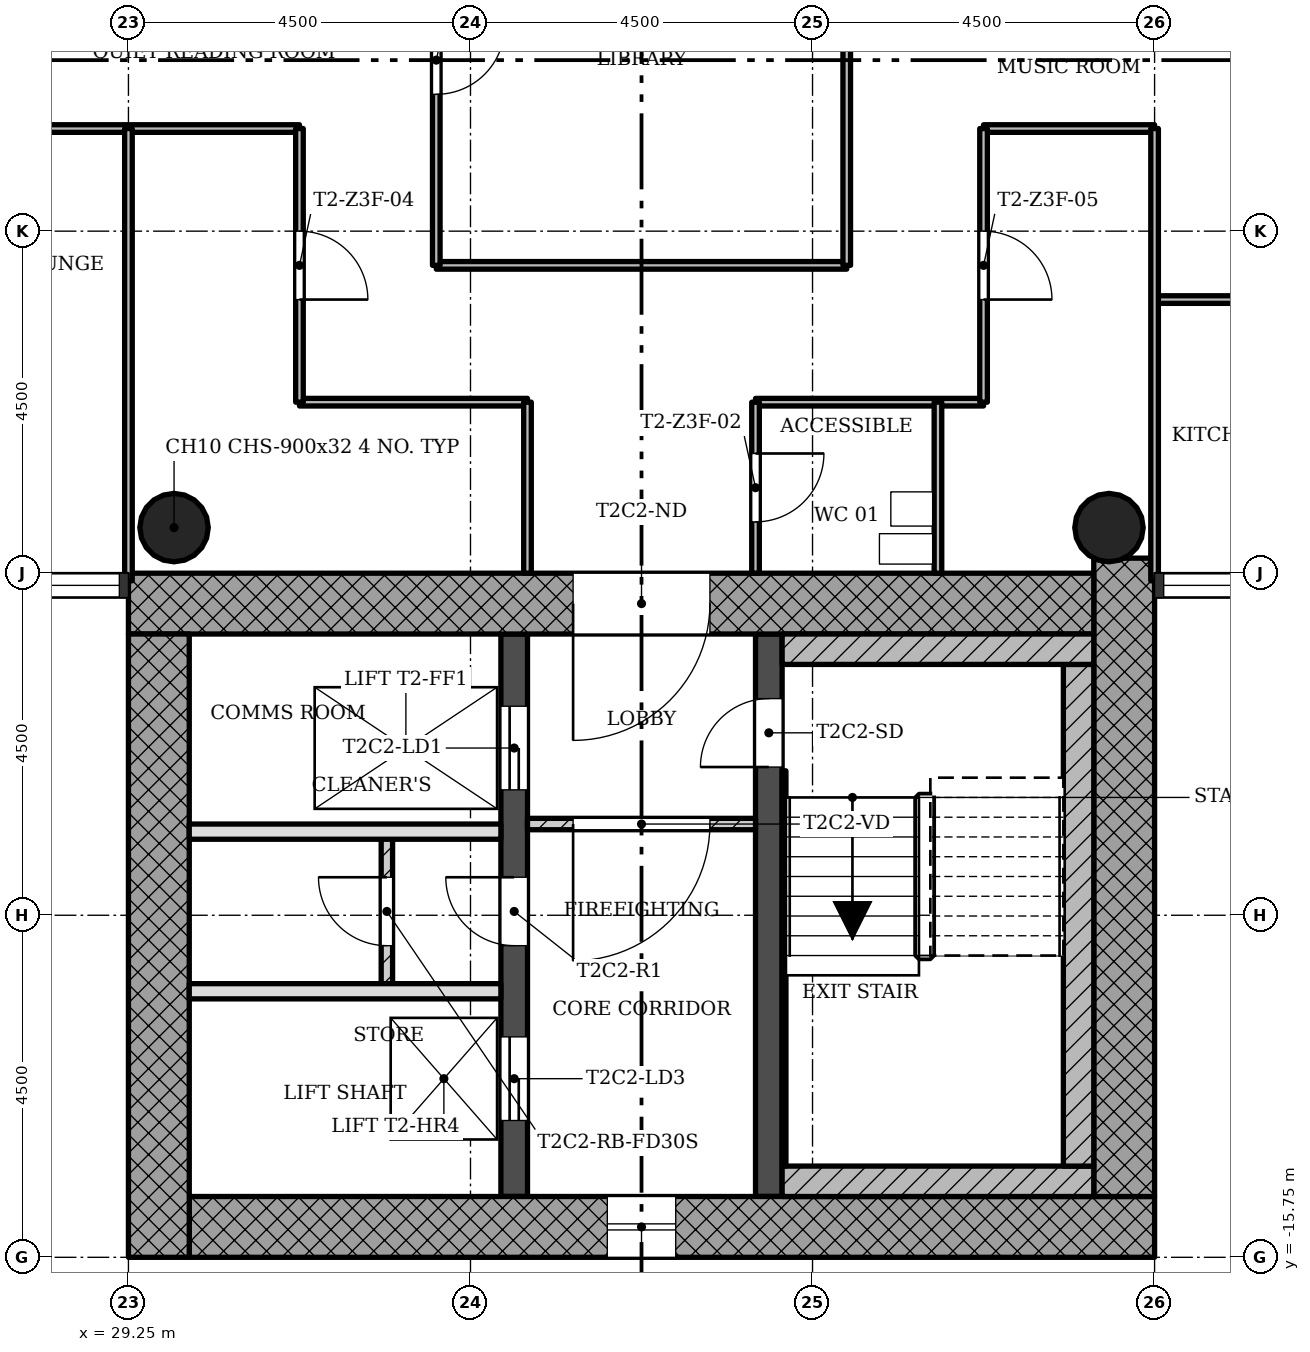
"""IFC4 building model, lengths in metres.
Left out: names, types, materials, properties, quantities, classifications, styles, units other than length and angle.
Written with IfcOpenShell. Run it as: python <this file> out.ifc"""

import sys

from ifc_helpers import new_model, si_unit, direction, frame, frame_2d, origin, origin_2d, place, context, subcontext, project, spatial, rectangle, hollow_circle, extrude, element, fill, save


model = new_model("IFC4")
c1 = context("Model", 3, precision=1e-05, world=origin(), true_north=direction((0.0, 1.0)))
c2 = subcontext(c1, "Body", "Model", "MODEL_VIEW")
j1 = project(units=[si_unit("LENGTHUNIT", "METRE"), si_unit("PLANEANGLEUNIT", "RADIAN")], contexts=[c1])
p1 = place(None, origin())
s1 = spatial("IfcSite", under=j1, at=p1, CompositionType="ELEMENT")
p2 = place(p1, origin())
s2 = spatial("IfcBuilding", under=s1, at=p2, CompositionType="ELEMENT")
p3 = place(p2, frame((0.0, 0.0, 171.1)))
s3 = spatial("IfcBuildingStorey", under=s2, at=p3, CompositionType="ELEMENT", Elevation=171.1)
p4 = place(p3, frame((30.05, -15.35, 0.0), z_axis=(0.0, 0.0, 1.0), x_axis=(1.0, 0.0, 0.0)))
e1 = element("IfcWall", 1, at=p4, inside=s3, PredefinedType="SHEAR", context=c2, shape_type="SweptSolid", body=[
    extrude(rectangle(XDim=12.7, YDim=0.8, at=frame_2d((6.35, 0.0))), origin(), (0.0, 0.0, 1.0), 3.4),
])
p5 = place(p4, frame((5.5, 0.0, 0.45)))
e2 = element("IfcOpeningElement", 2, at=p5, cuts=e1, PredefinedType="OPENING", context=c2, shape_type="SweptSolid", body=[
    extrude(rectangle(XDim=0.9, YDim=2.4, at=frame_2d((0.45, 1.2))), frame((0.0, 0.41, 0.0), z_axis=(0.0, -1.0, 0.0), x_axis=(1.0, 0.0, 0.0)), (0.0, 0.0, 1.0), 0.82),
])
p6 = place(p3, frame((42.35, -14.95, 0.0), z_axis=(0.0, 0.0, 1.0), x_axis=(0.0, 1.0, 0.0)))
e3 = element("IfcWall", 3, at=p6, inside=s3, PredefinedType="SHEAR", context=c2, shape_type="SweptSolid", body=[
    extrude(rectangle(XDim=8.398, YDim=0.8, at=frame_2d((4.199, 0.0))), origin(), (0.0, 0.0, 1.0), 3.4),
])
p7 = place(p3, frame((41.95, -7.15, 0.0), z_axis=(0.0, 0.0, 1.0), x_axis=(-1.0, 0.0, 0.0)))
e4 = element("IfcWall", 4, at=p7, inside=s3, PredefinedType="SHEAR", context=c2, shape_type="SweptSolid", body=[
    extrude(rectangle(XDim=12.7, YDim=0.8, at=frame_2d((6.35, 0.0))), origin(), (0.0, 0.0, 1.0), 3.4),
])
p8 = place(p7, frame((5.05, 0.0, 0.0)))
e5 = element("IfcOpeningElement", 5, at=p8, cuts=e4, PredefinedType="OPENING", context=c2, shape_type="SweptSolid", body=[
    extrude(rectangle(XDim=1.8, YDim=2.1, at=frame_2d((0.9, 1.05))), frame((0.0, 0.41, 0.0), z_axis=(0.0, -1.0, 0.0), x_axis=(1.0, 0.0, 0.0)), (0.0, 0.0, 1.0), 0.82),
])
p9 = place(p3, frame((29.65, -7.55, 0.0), z_axis=(0.0, 0.0, 1.0), x_axis=(0.0, -1.0, 0.0)))
e6 = element("IfcWall", 6, at=p9, inside=s3, PredefinedType="SHEAR", context=c2, shape_type="SweptSolid", body=[
    extrude(rectangle(XDim=8.2, YDim=0.8, at=frame_2d((4.1, 0.0))), origin(), (0.0, 0.0, 1.0), 3.4),
])
p10 = place(p3, frame((34.325, -14.95, 0.0), z_axis=(0.0, 0.0, 1.0), x_axis=(0.0, 1.0, 0.0)))
e7 = element("IfcWall", 7, at=p10, inside=s3, PredefinedType="SHEAR", context=c2, shape_type="SweptSolid", body=[
    extrude(rectangle(XDim=7.4, YDim=0.35, at=frame_2d((3.7, 0.0))), origin(), (0.0, 0.0, 1.0), 3.4),
])
p11 = place(p10, frame((5.35, 0.0, 0.0)))
e8 = element("IfcOpeningElement", 8, at=p11, cuts=e7, PredefinedType="OPENING", context=c2, shape_type="SweptSolid", body=[
    extrude(rectangle(XDim=1.1, YDim=2.1, at=frame_2d((0.55, 1.05))), frame((0.0, 0.185, 0.0), z_axis=(0.0, -1.0, 0.0), x_axis=(1.0, 0.0, 0.0)), (0.0, 0.0, 1.0), 0.37),
])
p12 = place(p10, frame((1.0, 0.0, 0.0)))
e9 = element("IfcOpeningElement", 9, at=p12, cuts=e7, PredefinedType="OPENING", context=c2, shape_type="SweptSolid", body=[
    extrude(rectangle(XDim=1.1, YDim=2.1, at=frame_2d((0.55, 1.05))), frame((0.0, 0.185, 0.0), z_axis=(0.0, -1.0, 0.0), x_axis=(1.0, 0.0, 0.0)), (0.0, 0.0, 1.0), 0.37),
])
p13 = place(p10, frame((3.3, 0.0, 0.0)))
e10 = element("IfcOpeningElement", 10, at=p13, cuts=e7, PredefinedType="OPENING", context=c2, shape_type="SweptSolid", body=[
    extrude(rectangle(XDim=0.9, YDim=2.1, at=frame_2d((0.45, 1.05))), frame((0.0, 0.185, 0.0), z_axis=(0.0, -1.0, 0.0), x_axis=(1.0, 0.0, 0.0)), (0.0, 0.0, 1.0), 0.37),
])
p14 = place(p3, frame((37.675, -14.95, 0.0), z_axis=(0.0, 0.0, 1.0), x_axis=(0.0, 1.0, 0.0)))
e11 = element("IfcWall", 11, at=p14, inside=s3, PredefinedType="SHEAR", context=c2, shape_type="SweptSolid", body=[
    extrude(rectangle(XDim=7.4, YDim=0.35, at=frame_2d((3.7, 0.0))), origin(), (0.0, 0.0, 1.0), 3.4),
])
p15 = place(p14, frame((5.65, 0.0, 0.0)))
e12 = element("IfcOpeningElement", 12, at=p15, cuts=e11, PredefinedType="OPENING", context=c2, shape_type="SweptSolid", body=[
    extrude(rectangle(XDim=0.9, YDim=2.1, at=frame_2d((0.45, 1.05))), frame((0.0, 0.185, 0.0), z_axis=(0.0, -1.0, 0.0), x_axis=(1.0, 0.0, 0.0)), (0.0, 0.0, 1.0), 0.37),
])
for number, where, z_axis, x_axis in (
    (13, (42.15, -6.15, 0.0), (0.0, 0.0, 1.0), (1.0, 0.0, 0.0)),
    (14, (29.85, -6.15, 0.0), (0.0, 0.0, 1.0), (1.0, 0.0, 0.0)),
):
    element("IfcColumn", number, at=place(p3, frame(where, z_axis=z_axis, x_axis=x_axis)), inside=s3, PredefinedType="COLUMN", context=c2, shape_type="SweptSolid", body=[
        extrude(hollow_circle(Radius=0.45, WallThickness=0.032, at=origin_2d()), origin(), (0.0, 0.0, 1.0), 3.4),
    ])
p16 = place(p3, frame((34.5, -10.05, 0.0), z_axis=(0.0, 0.0, 1.0), x_axis=(1.0, 0.0, 0.0)))
e15 = element("IfcWall", 15, at=p16, inside=s3, PredefinedType="PARTITIONING", context=c2, shape_type="SweptSolid", body=[
    extrude(rectangle(XDim=3.0, YDim=0.15, at=frame_2d((1.5, 0.0))), origin(), (0.0, 0.0, 1.0), 3.0),
])
p17 = place(p16, frame((0.6, 0.0, 0.0)))
e16 = element("IfcOpeningElement", 16, at=p17, cuts=e15, PredefinedType="OPENING", context=c2, shape_type="SweptSolid", body=[
    extrude(rectangle(XDim=1.8, YDim=2.1, at=frame_2d((0.9, 1.05))), frame((0.0, 0.085, 0.0), z_axis=(0.0, -1.0, 0.0), x_axis=(1.0, 0.0, 0.0)), (0.0, 0.0, 1.0), 0.17),
])
for number, where, z_axis, x_axis in (
    (17, (30.05, -12.25, 0.0), (0.0, 0.0, 1.0), (1.0, 0.0, 0.0)),
    (18, (30.05, -10.15, 0.0), (0.0, 0.0, 1.0), (1.0, 0.0, 0.0)),
):
    element("IfcWall", number, at=place(p3, frame(where, z_axis=z_axis, x_axis=x_axis)), inside=s3, PredefinedType="SOLIDWALL", context=c2, shape_type="SweptSolid", body=[
        extrude(rectangle(XDim=4.1, YDim=0.2, at=frame_2d((2.05, 0.0))), origin(), (0.0, 0.0, 1.0), 3.0),
    ])
p18 = place(p3, frame((32.65, -10.15, 0.0), z_axis=(0.0, 0.0, 1.0), x_axis=(0.0, -1.0, 0.0)))
e19 = element("IfcWall", 19, at=p18, inside=s3, PredefinedType="PARTITIONING", context=c2, shape_type="SweptSolid", body=[
    extrude(rectangle(XDim=2.1, YDim=0.15, at=frame_2d((1.05, 0.0))), origin(), (0.0, 0.0, 1.0), 3.0),
])
p19 = place(p18, frame((0.6, 0.0, 0.0)))
e20 = element("IfcOpeningElement", 20, at=p19, cuts=e19, PredefinedType="OPENING", context=c2, shape_type="SweptSolid", body=[
    extrude(rectangle(XDim=0.9, YDim=2.1, at=frame_2d((0.45, 1.05))), frame((0.0, 0.085, 0.0), z_axis=(0.0, -1.0, 0.0), x_axis=(1.0, 0.0, 0.0)), (0.0, 0.0, 1.0), 0.17),
])
for number, where, z_axis, x_axis in (
    (21, (40.5, -4.5, 0.0), (0.0, 0.0, 1.0), (-1.0, 0.0, 0.0)),
    (22, (34.5, -4.5, 0.0), (0.0, 0.0, 1.0), (-1.0, 0.0, 0.0)),
):
    element("IfcWall", number, at=place(p3, frame(where, z_axis=z_axis, x_axis=x_axis)), inside=s3, PredefinedType="PARTITIONING", context=c2, shape_type="SweptSolid", body=[
        extrude(rectangle(XDim=3.0, YDim=0.1, at=frame_2d((1.5, 0.0))), origin(), (0.0, 0.0, 1.0), 3.0),
    ])
p20 = place(p3, frame((47.25, -3.15, 0.0), z_axis=(0.0, 0.0, 1.0), x_axis=(-1.0, 0.0, 0.0)))
e23 = element("IfcWall", 23, at=p20, inside=s3, PredefinedType="PARTITIONING", context=c2, shape_type="SweptSolid", body=[
    extrude(rectangle(XDim=4.5, YDim=0.1, at=frame_2d((2.25, 0.0))), origin(), (0.0, 0.0, 1.0), 3.0),
])
p21 = place(p20, frame((1.8, 0.0, 0.0)))
e24 = element("IfcOpeningElement", 24, at=p21, cuts=e23, PredefinedType="OPENING", context=c2, shape_type="SweptSolid", body=[
    extrude(rectangle(XDim=0.9, YDim=2.1, at=frame_2d((0.45, 1.05))), frame((0.0, 0.06, 0.0), z_axis=(0.0, -1.0, 0.0), x_axis=(1.0, 0.0, 0.0)), (0.0, 0.0, 1.0), 0.12),
])
p22 = place(p3, frame((38.7, -2.7, 0.0), z_axis=(0.0, 0.0, 1.0), x_axis=(-1.0, 0.0, 0.0)))
e25 = element("IfcWall", 25, at=p22, inside=s3, PredefinedType="PARTITIONING", context=c2, shape_type="SweptSolid", body=[
    extrude(rectangle(XDim=5.4, YDim=0.1, at=frame_2d((2.7, 0.0))), origin(), (0.0, 0.0, 1.0), 3.0),
])
p23 = place(p3, frame((42.75, -0.9, 0.0), z_axis=(0.0, 0.0, 1.0), x_axis=(-1.0, 0.0, 0.0)))
e26 = element("IfcWall", 26, at=p23, inside=s3, PredefinedType="PARTITIONING", context=c2, shape_type="SweptSolid", body=[
    extrude(rectangle(XDim=2.25, YDim=0.1, at=frame_2d((1.125, 0.0))), origin(), (0.0, 0.0, 1.0), 3.0),
])
p24 = place(p3, frame((31.5, -0.9, 0.0), z_axis=(0.0, 0.0, 1.0), x_axis=(-1.0, 0.0, 0.0)))
e27 = element("IfcWall", 27, at=p24, inside=s3, PredefinedType="PARTITIONING", context=c2, shape_type="SweptSolid", body=[
    extrude(rectangle(XDim=6.75, YDim=0.1, at=frame_2d((3.375, 0.0))), origin(), (0.0, 0.0, 1.0), 3.0),
])
p25 = place(p24, frame((4.05, 0.0, 0.0)))
e28 = element("IfcOpeningElement", 28, at=p25, cuts=e27, PredefinedType="OPENING", context=c2, shape_type="SweptSolid", body=[
    extrude(rectangle(XDim=0.9, YDim=2.1, at=frame_2d((0.45, 1.05))), frame((0.0, 0.06, 0.0), z_axis=(0.0, -1.0, 0.0), x_axis=(1.0, 0.0, 0.0)), (0.0, 0.0, 1.0), 0.12),
])
p26 = place(p3, frame((42.75, -6.85, 0.0), z_axis=(0.0, 0.0, 1.0), x_axis=(0.0, 1.0, 0.0)))
e29 = element("IfcWall", 29, at=p26, inside=s3, PredefinedType="PARTITIONING", context=c2, shape_type="SweptSolid", body=[
    extrude(rectangle(XDim=5.95, YDim=0.1, at=frame_2d((2.975, 0.0))), origin(), (0.0, 0.0, 1.0), 3.0),
])
p27 = place(p3, frame((40.5, -4.5, 0.0), z_axis=(0.0, 0.0, 1.0), x_axis=(0.0, 1.0, 0.0)))
e30 = element("IfcWall", 30, at=p27, inside=s3, PredefinedType="PARTITIONING", context=c2, shape_type="SweptSolid", body=[
    extrude(rectangle(XDim=3.6, YDim=0.1, at=frame_2d((1.8, 0.0))), origin(), (0.0, 0.0, 1.0), 3.0),
])
p28 = place(p27, frame((1.35, 0.0, 0.0)))
e31 = element("IfcOpeningElement", 31, at=p28, cuts=e30, PredefinedType="OPENING", context=c2, shape_type="SweptSolid", body=[
    extrude(rectangle(XDim=0.9, YDim=2.1, at=frame_2d((0.45, 1.05))), frame((0.0, 0.06, 0.0), z_axis=(0.0, -1.0, 0.0), x_axis=(1.0, 0.0, 0.0)), (0.0, 0.0, 1.0), 0.12),
])
p29 = place(p3, frame((39.9, -6.75, 0.0), z_axis=(0.0, 0.0, 1.0), x_axis=(0.0, 1.0, 0.0)))
e32 = element("IfcWall", 32, at=p29, inside=s3, PredefinedType="PARTITIONING", context=c2, shape_type="SweptSolid", body=[
    extrude(rectangle(XDim=2.25, YDim=0.1, at=frame_2d((1.125, 0.0))), origin(), (0.0, 0.0, 1.0), 3.0),
])
p30 = place(p3, frame((38.7, -2.7, 0.0), z_axis=(0.0, 0.0, 1.0), x_axis=(0.0, 1.0, 0.0)))
e33 = element("IfcWall", 33, at=p30, inside=s3, PredefinedType="PARTITIONING", context=c2, shape_type="SweptSolid", body=[
    extrude(rectangle(XDim=5.4, YDim=0.1, at=frame_2d((2.7, 0.0))), origin(), (0.0, 0.0, 1.0), 3.0),
])
p31 = place(p3, frame((37.5, -6.75, 0.0), z_axis=(0.0, 0.0, 1.0), x_axis=(0.0, 1.0, 0.0)))
e34 = element("IfcWall", 34, at=p31, inside=s3, PredefinedType="PARTITIONING", context=c2, shape_type="SweptSolid", body=[
    extrude(rectangle(XDim=2.25, YDim=0.1, at=frame_2d((1.125, 0.0))), origin(), (0.0, 0.0, 1.0), 3.0),
])
p32 = place(p31, frame((0.675, 0.0, 0.0)))
e35 = element("IfcOpeningElement", 35, at=p32, cuts=e34, PredefinedType="OPENING", context=c2, shape_type="SweptSolid", body=[
    extrude(rectangle(XDim=0.9, YDim=2.1, at=frame_2d((0.45, 1.05))), frame((0.0, 0.06, 0.0), z_axis=(0.0, -1.0, 0.0), x_axis=(1.0, 0.0, 0.0)), (0.0, 0.0, 1.0), 0.12),
])
p33 = place(p3, frame((34.5, -6.75, 0.0), z_axis=(0.0, 0.0, 1.0), x_axis=(0.0, 1.0, 0.0)))
e36 = element("IfcWall", 36, at=p33, inside=s3, PredefinedType="PARTITIONING", context=c2, shape_type="SweptSolid", body=[
    extrude(rectangle(XDim=2.25, YDim=0.1, at=frame_2d((1.125, 0.0))), origin(), (0.0, 0.0, 1.0), 3.0),
])
p34 = place(p3, frame((33.3, -2.7, 0.0), z_axis=(0.0, 0.0, 1.0), x_axis=(0.0, 1.0, 0.0)))
e37 = element("IfcWall", 37, at=p34, inside=s3, PredefinedType="PARTITIONING", context=c2, shape_type="SweptSolid", body=[
    extrude(rectangle(XDim=5.4, YDim=0.1, at=frame_2d((2.7, 0.0))), origin(), (0.0, 0.0, 1.0), 3.0),
])
p35 = place(p34, frame((2.25, 0.0, 0.0)))
e38 = element("IfcOpeningElement", 38, at=p35, cuts=e37, PredefinedType="OPENING", context=c2, shape_type="SweptSolid", body=[
    extrude(rectangle(XDim=0.9, YDim=2.1, at=frame_2d((0.45, 1.05))), frame((0.0, 0.06, 0.0), z_axis=(0.0, -1.0, 0.0), x_axis=(1.0, 0.0, 0.0)), (0.0, 0.0, 1.0), 0.12),
])
p36 = place(p3, frame((31.5, -4.5, 0.0), z_axis=(0.0, 0.0, 1.0), x_axis=(0.0, 1.0, 0.0)))
e39 = element("IfcWall", 39, at=p36, inside=s3, PredefinedType="PARTITIONING", context=c2, shape_type="SweptSolid", body=[
    extrude(rectangle(XDim=3.6, YDim=0.1, at=frame_2d((1.8, 0.0))), origin(), (0.0, 0.0, 1.0), 3.0),
])
p37 = place(p36, frame((1.35, 0.0, 0.0)))
e40 = element("IfcOpeningElement", 40, at=p37, cuts=e39, PredefinedType="OPENING", context=c2, shape_type="SweptSolid", body=[
    extrude(rectangle(XDim=0.9, YDim=2.1, at=frame_2d((0.45, 1.05))), frame((0.0, 0.06, 0.0), z_axis=(0.0, -1.0, 0.0), x_axis=(1.0, 0.0, 0.0)), (0.0, 0.0, 1.0), 0.12),
])
p38 = place(p3, frame((29.25, -6.85, 0.0), z_axis=(0.0, 0.0, 1.0), x_axis=(0.0, 1.0, 0.0)))
e41 = element("IfcWall", 41, at=p38, inside=s3, PredefinedType="PARTITIONING", context=c2, shape_type="SweptSolid", body=[
    extrude(rectangle(XDim=5.95, YDim=0.1, at=frame_2d((2.975, 0.0))), origin(), (0.0, 0.0, 1.0), 3.0),
])
p39 = place(p3, frame((37.85, -14.75, 0.0), z_axis=(0.0, 0.0, 1.0), x_axis=(1.0, 0.0, 0.0)))
e42 = element("IfcWall", 42, at=p39, inside=s3, PredefinedType="SHEAR", context=c2, shape_type="SweptSolid", body=[
    extrude(rectangle(XDim=4.1, YDim=0.4, at=frame_2d((2.05, 0.0))), origin(), (0.0, 0.0, 1.0), 3.4),
])
p40 = place(p3, frame((41.75, -7.95, 0.0), z_axis=(0.0, 0.0, 1.0), x_axis=(0.0, -1.0, 0.0)))
e43 = element("IfcWall", 43, at=p40, inside=s3, PredefinedType="SHEAR", context=c2, shape_type="SweptSolid", body=[
    extrude(rectangle(XDim=6.6, YDim=0.4, at=frame_2d((3.3, 0.0))), origin(), (0.0, 0.0, 1.0), 3.4),
])
p41 = place(p3, frame((37.85, -7.75, 0.0), z_axis=(0.0, 0.0, 1.0), x_axis=(1.0, 0.0, 0.0)))
e44 = element("IfcWall", 44, at=p41, inside=s3, PredefinedType="SHEAR", context=c2, shape_type="SweptSolid", body=[
    extrude(rectangle(XDim=4.1, YDim=0.4, at=frame_2d((2.05, 0.0))), origin(), (0.0, 0.0, 1.0), 3.4),
])
p42 = place(p3, frame((37.875, -9.35, 0.0), z_axis=(0.0, 0.0, 1.0), x_axis=(0.0, -1.0, 0.0)))
e45 = element("IfcWall", 45, at=p42, inside=s3, PredefinedType="SHEAR", context=c2, shape_type="SweptSolid", body=[
    extrude(rectangle(XDim=5.2, YDim=0.05, at=frame_2d((2.6, 0.0))), origin(), (0.0, 0.0, 1.0), 3.4),
])
p43 = place(p5, origin())
e46 = element("IfcWindow", 46, at=p43, inside=s3, PartitioningType="SINGLE_PANEL", PredefinedType="WINDOW", context=c2, shape_type="SweptSolid", body=[
    extrude(rectangle(XDim=0.9, YDim=2.4, at=frame_2d((0.45, 1.2))), frame((0.0, 0.03, 0.0), z_axis=(0.0, -1.0, 0.0), x_axis=(1.0, 0.0, 0.0)), (0.0, 0.0, 1.0), 0.06),
])
fill(e2, e46)
p44 = place(p17, origin())
e47 = element("IfcDoor", 47, at=p44, inside=s3, OperationType="SINGLE_SWING_LEFT", PredefinedType="DOOR", context=c2, shape_type="SweptSolid", body=[
    extrude(rectangle(XDim=1.8, YDim=2.1, at=frame_2d((0.9, 1.05))), frame((0.0, 0.025, 0.0), z_axis=(0.0, -1.0, 0.0), x_axis=(1.0, 0.0, 0.0)), (0.0, 0.0, 1.0), 0.05),
])
fill(e16, e47)
p45 = place(p19, origin())
e48 = element("IfcDoor", 48, at=p45, inside=s3, OperationType="SINGLE_SWING_LEFT", PredefinedType="DOOR", context=c2, shape_type="SweptSolid", body=[
    extrude(rectangle(XDim=0.9, YDim=2.1, at=frame_2d((0.45, 1.05))), frame((0.0, 0.025, 0.0), z_axis=(0.0, -1.0, 0.0), x_axis=(1.0, 0.0, 0.0)), (0.0, 0.0, 1.0), 0.05),
])
fill(e20, e48)
p46 = place(p35, origin())
e49 = element("IfcDoor", 49, at=p46, inside=s3, OperationType="SINGLE_SWING_RIGHT", PredefinedType="DOOR", context=c2, shape_type="SweptSolid", body=[
    extrude(rectangle(XDim=0.9, YDim=2.1, at=frame_2d((0.45, 1.05))), frame((0.0, 0.025, 0.0), z_axis=(0.0, -1.0, 0.0), x_axis=(1.0, 0.0, 0.0)), (0.0, 0.0, 1.0), 0.05),
])
fill(e38, e49)
p47 = place(p32, origin())
e50 = element("IfcDoor", 50, at=p47, inside=s3, OperationType="SINGLE_SWING_RIGHT", PredefinedType="DOOR", context=c2, shape_type="SweptSolid", body=[
    extrude(rectangle(XDim=0.9, YDim=2.1, at=frame_2d((0.45, 1.05))), frame((0.0, 0.025, 0.0), z_axis=(0.0, -1.0, 0.0), x_axis=(1.0, 0.0, 0.0)), (0.0, 0.0, 1.0), 0.05),
])
fill(e35, e50)
p48 = place(p37, origin())
e51 = element("IfcDoor", 51, at=p48, inside=s3, OperationType="SINGLE_SWING_LEFT", PredefinedType="DOOR", context=c2, shape_type="SweptSolid", body=[
    extrude(rectangle(XDim=0.9, YDim=2.1, at=frame_2d((0.45, 1.05))), frame((0.0, 0.025, 0.0), z_axis=(0.0, -1.0, 0.0), x_axis=(1.0, 0.0, 0.0)), (0.0, 0.0, 1.0), 0.05),
])
fill(e40, e51)
p49 = place(p28, origin())
e52 = element("IfcDoor", 52, at=p49, inside=s3, OperationType="SINGLE_SWING_LEFT", PredefinedType="DOOR", context=c2, shape_type="SweptSolid", body=[
    extrude(rectangle(XDim=0.9, YDim=2.1, at=frame_2d((0.45, 1.05))), frame((0.0, 0.025, 0.0), z_axis=(0.0, -1.0, 0.0), x_axis=(1.0, 0.0, 0.0)), (0.0, 0.0, 1.0), 0.05),
])
fill(e31, e52)
p50 = place(p15, origin())
e53 = element("IfcDoor", 53, at=p50, inside=s3, OperationType="SINGLE_SWING_RIGHT", PredefinedType="DOOR", context=c2, shape_type="SweptSolid", body=[
    extrude(rectangle(XDim=0.9, YDim=2.1, at=frame_2d((0.45, 1.05))), frame((0.0, 0.025, 0.0), z_axis=(0.0, -1.0, 0.0), x_axis=(1.0, 0.0, 0.0)), (0.0, 0.0, 1.0), 0.05),
])
fill(e12, e53)
p51 = place(p11, origin())
e54 = element("IfcDoor", 54, at=p51, inside=s3, OperationType="SLIDING_TO_LEFT", PredefinedType="DOOR", context=c2, shape_type="SweptSolid", body=[
    extrude(rectangle(XDim=1.1, YDim=2.1, at=frame_2d((0.55, 1.05))), frame((0.0, 0.025, 0.0), z_axis=(0.0, -1.0, 0.0), x_axis=(1.0, 0.0, 0.0)), (0.0, 0.0, 1.0), 0.05),
])
fill(e8, e54)
p52 = place(p12, origin())
e55 = element("IfcDoor", 55, at=p52, inside=s3, OperationType="SLIDING_TO_LEFT", PredefinedType="DOOR", context=c2, shape_type="SweptSolid", body=[
    extrude(rectangle(XDim=1.1, YDim=2.1, at=frame_2d((0.55, 1.05))), frame((0.0, 0.025, 0.0), z_axis=(0.0, -1.0, 0.0), x_axis=(1.0, 0.0, 0.0)), (0.0, 0.0, 1.0), 0.05),
])
fill(e9, e55)
p53 = place(p13, origin())
e56 = element("IfcDoor", 56, at=p53, inside=s3, OperationType="SINGLE_SWING_LEFT", PredefinedType="DOOR", context=c2, shape_type="SweptSolid", body=[
    extrude(rectangle(XDim=0.9, YDim=2.1, at=frame_2d((0.45, 1.05))), frame((0.0, 0.025, 0.0), z_axis=(0.0, -1.0, 0.0), x_axis=(1.0, 0.0, 0.0)), (0.0, 0.0, 1.0), 0.05),
])
fill(e10, e56)
p54 = place(p8, origin())
e57 = element("IfcDoor", 57, at=p54, inside=s3, OperationType="SINGLE_SWING_LEFT", PredefinedType="DOOR", context=c2, shape_type="SweptSolid", body=[
    extrude(rectangle(XDim=1.8, YDim=2.1, at=frame_2d((0.9, 1.05))), frame((0.0, 0.025, 0.0), z_axis=(0.0, -1.0, 0.0), x_axis=(1.0, 0.0, 0.0)), (0.0, 0.0, 1.0), 0.05),
])
fill(e5, e57)
save(model, sys.argv[1])
